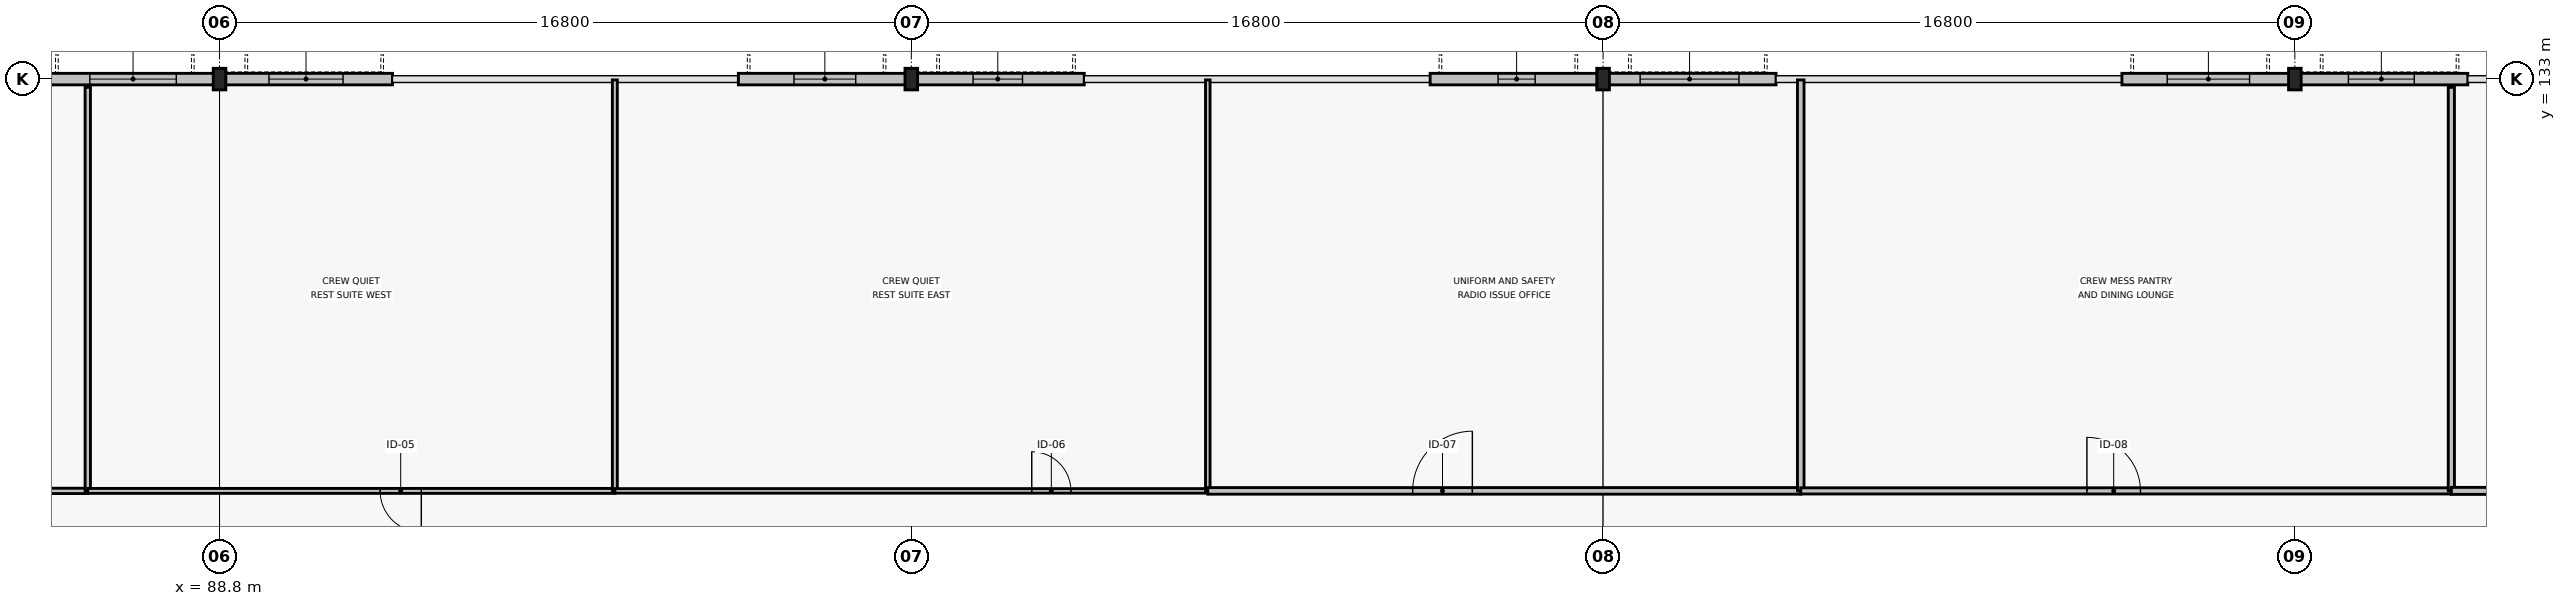
"""IFC4 building model, lengths in metres.
Left out: names, types, materials, properties, quantities, classifications, styles, units other than length and angle.
Written with IfcOpenShell. Run it as: python <this file> out.ifc"""

import sys

from ifc_helpers import new_model, si_unit, direction, frame, frame_2d, origin, origin_2d, place, context, subcontext, project, spatial, rectangle, i_section, extrude, element, fill, save


model = new_model("IFC4")
c1 = context("Model", 3, precision=1e-05, world=origin(), true_north=direction((0.0, 1.0)))
c2 = subcontext(c1, "Body", "Model", "MODEL_VIEW")
j1 = project(units=[si_unit("LENGTHUNIT", "METRE"), si_unit("PLANEANGLEUNIT", "RADIAN")], contexts=[c1])
p1 = place(None, origin())
s1 = spatial("IfcSite", under=j1, at=p1, CompositionType="ELEMENT")
p2 = place(p1, origin())
s2 = spatial("IfcBuilding", under=s1, at=p2, CompositionType="ELEMENT")
p3 = place(p2, frame((0.0, 0.0, 5.4)))
s3 = spatial("IfcBuildingStorey", under=s2, at=p3, CompositionType="ELEMENT", Elevation=5.4)
for number, where, z_axis, x_axis in (
    (1, (88.8, 133.0, 0.0), (0.0, 0.0, 1.0), (1.0, 0.0, 0.0)),
    (2, (105.6, 133.0, 0.0), (0.0, 0.0, 1.0), (1.0, 0.0, 0.0)),
    (3, (122.4, 133.0, 0.0), (0.0, 0.0, 1.0), (1.0, 0.0, 0.0)),
    (4, (139.2, 133.0, 0.0), (0.0, 0.0, 1.0), (1.0, 0.0, 0.0)),
):
    element("IfcColumn", number, at=place(p3, frame(where, z_axis=z_axis, x_axis=x_axis)), inside=s3, PredefinedType="COLUMN", context=c2, shape_type="SweptSolid", body=[
        extrude(i_section(OverallWidth=0.306, OverallDepth=0.524, WebThickness=0.021, FlangeThickness=0.04, FilletRadius=0.027, at=origin_2d()), origin(), (0.0, 0.0, 1.0), 5.4),
    ])
p4 = place(p3, frame((84.6, 133.0, 0.0), z_axis=(0.0, 0.0, 1.0), x_axis=(1.0, 0.0, 0.0)))
e5 = element("IfcWall", 5, at=p4, inside=s3, PredefinedType="STANDARD", context=c2, shape_type="SweptSolid", body=[
    extrude(rectangle(XDim=4.2, YDim=0.28, at=frame_2d((2.1, 0.0))), origin(), (0.0, 0.0, 1.0), 4.765),
])
p5 = place(p4, frame((1.05, 0.0, 0.8)))
e6 = element("IfcOpeningElement", 6, at=p5, cuts=e5, PredefinedType="OPENING", context=c2, shape_type="SweptSolid", body=[
    extrude(rectangle(XDim=2.1, YDim=1.75, at=frame_2d((1.05, 0.875))), frame((0.0, 0.15, 0.0), z_axis=(0.0, -1.0, 0.0), x_axis=(1.0, 0.0, 0.0)), (0.0, 0.0, 1.0), 0.3),
])
p6 = place(p3, frame((88.8, 133.0, 0.0), z_axis=(0.0, 0.0, 1.0), x_axis=(1.0, 0.0, 0.0)))
e7 = element("IfcWall", 7, at=p6, inside=s3, PredefinedType="STANDARD", context=c2, shape_type="SweptSolid", body=[
    extrude(rectangle(XDim=4.2, YDim=0.28, at=frame_2d((2.1, 0.0))), origin(), (0.0, 0.0, 1.0), 4.765),
])
p7 = place(p6, frame((1.2, 0.0, 0.8)))
e8 = element("IfcOpeningElement", 8, at=p7, cuts=e7, PredefinedType="OPENING", context=c2, shape_type="SweptSolid", body=[
    extrude(rectangle(XDim=1.8, YDim=1.75, at=frame_2d((0.9, 0.875))), frame((0.0, 0.15, 0.0), z_axis=(0.0, -1.0, 0.0), x_axis=(1.0, 0.0, 0.0)), (0.0, 0.0, 1.0), 0.3),
])
p8 = place(p3, frame((101.4, 133.0, 0.0), z_axis=(0.0, 0.0, 1.0), x_axis=(1.0, 0.0, 0.0)))
e9 = element("IfcWall", 9, at=p8, inside=s3, PredefinedType="STANDARD", context=c2, shape_type="SweptSolid", body=[
    extrude(rectangle(XDim=4.2, YDim=0.28, at=frame_2d((2.1, 0.0))), origin(), (0.0, 0.0, 1.0), 4.765),
])
p9 = place(p8, frame((1.35, 0.0, 0.8)))
e10 = element("IfcOpeningElement", 10, at=p9, cuts=e9, PredefinedType="OPENING", context=c2, shape_type="SweptSolid", body=[
    extrude(rectangle(XDim=1.5, YDim=1.75, at=frame_2d((0.75, 0.875))), frame((0.0, 0.15, 0.0), z_axis=(0.0, -1.0, 0.0), x_axis=(1.0, 0.0, 0.0)), (0.0, 0.0, 1.0), 0.3),
])
p10 = place(p3, frame((105.6, 133.0, 0.0), z_axis=(0.0, 0.0, 1.0), x_axis=(1.0, 0.0, 0.0)))
e11 = element("IfcWall", 11, at=p10, inside=s3, PredefinedType="STANDARD", context=c2, shape_type="SweptSolid", body=[
    extrude(rectangle(XDim=4.2, YDim=0.28, at=frame_2d((2.1, 0.0))), origin(), (0.0, 0.0, 1.0), 4.765),
])
p11 = place(p10, frame((1.5, 0.0, 0.8)))
e12 = element("IfcOpeningElement", 12, at=p11, cuts=e11, PredefinedType="OPENING", context=c2, shape_type="SweptSolid", body=[
    extrude(rectangle(XDim=1.2, YDim=1.75, at=frame_2d((0.6, 0.875))), frame((0.0, 0.15, 0.0), z_axis=(0.0, -1.0, 0.0), x_axis=(1.0, 0.0, 0.0)), (0.0, 0.0, 1.0), 0.3),
])
p12 = place(p3, frame((118.2, 133.0, 0.0), z_axis=(0.0, 0.0, 1.0), x_axis=(1.0, 0.0, 0.0)))
e13 = element("IfcWall", 13, at=p12, inside=s3, PredefinedType="STANDARD", context=c2, shape_type="SweptSolid", body=[
    extrude(rectangle(XDim=4.2, YDim=0.28, at=frame_2d((2.1, 0.0))), origin(), (0.0, 0.0, 1.0), 4.765),
])
p13 = place(p12, frame((1.65, 0.0, 0.8)))
e14 = element("IfcOpeningElement", 14, at=p13, cuts=e13, PredefinedType="OPENING", context=c2, shape_type="SweptSolid", body=[
    extrude(rectangle(XDim=0.9, YDim=1.75, at=frame_2d((0.45, 0.875))), frame((0.0, 0.15, 0.0), z_axis=(0.0, -1.0, 0.0), x_axis=(1.0, 0.0, 0.0)), (0.0, 0.0, 1.0), 0.3),
])
p14 = place(p3, frame((122.4, 133.0, 0.0), z_axis=(0.0, 0.0, 1.0), x_axis=(1.0, 0.0, 0.0)))
e15 = element("IfcWall", 15, at=p14, inside=s3, PredefinedType="STANDARD", context=c2, shape_type="SweptSolid", body=[
    extrude(rectangle(XDim=4.2, YDim=0.28, at=frame_2d((2.1, 0.0))), origin(), (0.0, 0.0, 1.0), 4.765),
])
p15 = place(p14, frame((0.9, 0.0, 0.8)))
e16 = element("IfcOpeningElement", 16, at=p15, cuts=e15, PredefinedType="OPENING", context=c2, shape_type="SweptSolid", body=[
    extrude(rectangle(XDim=2.4, YDim=1.5, at=frame_2d((1.2, 0.75))), frame((0.0, 0.15, 0.0), z_axis=(0.0, -1.0, 0.0), x_axis=(1.0, 0.0, 0.0)), (0.0, 0.0, 1.0), 0.3),
])
p16 = place(p3, frame((135.0, 133.0, 0.0), z_axis=(0.0, 0.0, 1.0), x_axis=(1.0, 0.0, 0.0)))
e17 = element("IfcWall", 17, at=p16, inside=s3, PredefinedType="STANDARD", context=c2, shape_type="SweptSolid", body=[
    extrude(rectangle(XDim=4.2, YDim=0.28, at=frame_2d((2.1, 0.0))), origin(), (0.0, 0.0, 1.0), 4.765),
])
p17 = place(p16, frame((1.1, 0.0, 0.8)))
e18 = element("IfcOpeningElement", 18, at=p17, cuts=e17, PredefinedType="OPENING", context=c2, shape_type="SweptSolid", body=[
    extrude(rectangle(XDim=2.0, YDim=1.5, at=frame_2d((1.0, 0.75))), frame((0.0, 0.15, 0.0), z_axis=(0.0, -1.0, 0.0), x_axis=(1.0, 0.0, 0.0)), (0.0, 0.0, 1.0), 0.3),
])
p18 = place(p3, frame((139.2, 133.0, 0.0), z_axis=(0.0, 0.0, 1.0), x_axis=(1.0, 0.0, 0.0)))
e19 = element("IfcWall", 19, at=p18, inside=s3, PredefinedType="STANDARD", context=c2, shape_type="SweptSolid", body=[
    extrude(rectangle(XDim=4.2, YDim=0.28, at=frame_2d((2.1, 0.0))), origin(), (0.0, 0.0, 1.0), 4.765),
])
p19 = place(p18, frame((1.3, 0.0, 0.8)))
e20 = element("IfcOpeningElement", 20, at=p19, cuts=e19, PredefinedType="OPENING", context=c2, shape_type="SweptSolid", body=[
    extrude(rectangle(XDim=1.6, YDim=1.5, at=frame_2d((0.8, 0.75))), frame((0.0, 0.15, 0.0), z_axis=(0.0, -1.0, 0.0), x_axis=(1.0, 0.0, 0.0)), (0.0, 0.0, 1.0), 0.3),
])
p20 = place(p3, frame((69.6, 123.0, 0.0), z_axis=(0.0, 0.0, 1.0), x_axis=(1.0, 0.0, 0.0)))
e21 = element("IfcWall", 21, at=p20, inside=s3, PredefinedType="PARTITIONING", context=c2, shape_type="SweptSolid", body=[
    extrude(rectangle(XDim=16.0, YDim=0.13, at=frame_2d((8.0, 0.0))), origin(), (0.0, 0.0, 1.0), 5.16),
])
p21 = place(p20, frame((8.55, 0.0, 0.0), z_axis=(0.0, 0.0, 1.0), x_axis=(-1.0, 0.0, 0.0)))
e22 = element("IfcOpeningElement", 22, at=p21, cuts=e21, PredefinedType="OPENING", context=c2, shape_type="SweptSolid", body=[
    extrude(rectangle(XDim=1.1, YDim=2.15, at=frame_2d((0.55, 1.075))), frame((0.0, 0.075, 0.0), z_axis=(0.0, -1.0, 0.0), x_axis=(1.0, 0.0, 0.0)), (0.0, 0.0, 1.0), 0.15),
])
p22 = place(p3, frame((85.6, 123.0, 0.0), z_axis=(0.0, 0.0, 1.0), x_axis=(0.0, 1.0, 0.0)))
e23 = element("IfcWall", 23, at=p22, inside=s3, PredefinedType="PARTITIONING", context=c2, shape_type="SweptSolid", body=[
    extrude(rectangle(XDim=9.8, YDim=0.13, at=frame_2d((4.9, 0.0))), origin(), (0.0, 0.0, 1.0), 5.16),
])
p23 = place(p3, frame((85.6, 123.0, 0.0), z_axis=(0.0, 0.0, 1.0), x_axis=(1.0, 0.0, 0.0)))
e24 = element("IfcWall", 24, at=p23, inside=s3, PredefinedType="PARTITIONING", context=c2, shape_type="SweptSolid", body=[
    extrude(rectangle(XDim=12.8, YDim=0.12, at=frame_2d((6.4, 0.0))), origin(), (0.0, 0.0, 1.0), 5.16),
])
p24 = place(p23, frame((7.1, 0.0, 0.0)))
e25 = element("IfcOpeningElement", 25, at=p24, cuts=e24, PredefinedType="OPENING", context=c2, shape_type="SweptSolid", body=[
    extrude(rectangle(XDim=1.0, YDim=2.15, at=frame_2d((0.5, 1.075))), frame((0.0, 0.07, 0.0), z_axis=(0.0, -1.0, 0.0), x_axis=(1.0, 0.0, 0.0)), (0.0, 0.0, 1.0), 0.14),
])
p25 = place(p3, frame((98.4, 123.0, 0.0), z_axis=(0.0, 0.0, 1.0), x_axis=(0.0, 1.0, 0.0)))
e26 = element("IfcWall", 26, at=p25, inside=s3, PredefinedType="PARTITIONING", context=c2, shape_type="SweptSolid", body=[
    extrude(rectangle(XDim=9.98, YDim=0.12, at=frame_2d((4.99, 0.0))), origin(), (0.0, 0.0, 1.0), 5.16),
])
p26 = place(p3, frame((98.4, 123.0, 0.0), z_axis=(0.0, 0.0, 1.0), x_axis=(1.0, 0.0, 0.0)))
e27 = element("IfcWall", 27, at=p26, inside=s3, PredefinedType="MOVABLE", context=c2, shape_type="SweptSolid", body=[
    extrude(rectangle(XDim=14.4, YDim=0.11, at=frame_2d((7.2, 0.0))), origin(), (0.0, 0.0, 1.0), 5.16),
])
p27 = place(p26, frame((10.125, 0.0, 0.0)))
e28 = element("IfcOpeningElement", 28, at=p27, cuts=e27, PredefinedType="OPENING", context=c2, shape_type="SweptSolid", body=[
    extrude(rectangle(XDim=0.95, YDim=2.15, at=frame_2d((0.475, 1.075))), frame((0.0, 0.065, 0.0), z_axis=(0.0, -1.0, 0.0), x_axis=(1.0, 0.0, 0.0)), (0.0, 0.0, 1.0), 0.13),
])
p28 = place(p3, frame((112.8, 123.0, 0.0), z_axis=(0.0, 0.0, 1.0), x_axis=(0.0, 1.0, 0.0)))
e29 = element("IfcWall", 29, at=p28, inside=s3, PredefinedType="MOVABLE", context=c2, shape_type="SweptSolid", body=[
    extrude(rectangle(XDim=9.98, YDim=0.11, at=frame_2d((4.99, 0.0))), origin(), (0.0, 0.0, 1.0), 5.16),
])
p29 = place(p3, frame((112.8, 123.0, 0.0), z_axis=(0.0, 0.0, 1.0), x_axis=(1.0, 0.0, 0.0)))
e30 = element("IfcWall", 30, at=p29, inside=s3, PredefinedType="PARTITIONING", context=c2, shape_type="SweptSolid", body=[
    extrude(rectangle(XDim=14.4, YDim=0.16, at=frame_2d((7.2, 0.0))), origin(), (0.0, 0.0, 1.0), 5.16),
])
p30 = place(p29, frame((6.425, 0.0, 0.0), z_axis=(0.0, 0.0, 1.0), x_axis=(-1.0, 0.0, 0.0)))
e31 = element("IfcOpeningElement", 31, at=p30, cuts=e30, PredefinedType="OPENING", context=c2, shape_type="SweptSolid", body=[
    extrude(rectangle(XDim=1.45, YDim=2.25, at=frame_2d((0.725, 1.125))), frame((0.0, 0.09, 0.0), z_axis=(0.0, -1.0, 0.0), x_axis=(1.0, 0.0, 0.0)), (0.0, 0.0, 1.0), 0.18),
])
p31 = place(p3, frame((127.2, 123.0, 0.0), z_axis=(0.0, 0.0, 1.0), x_axis=(0.0, 1.0, 0.0)))
e32 = element("IfcWall", 32, at=p31, inside=s3, PredefinedType="PARTITIONING", context=c2, shape_type="SweptSolid", body=[
    extrude(rectangle(XDim=9.98, YDim=0.16, at=frame_2d((4.99, 0.0))), origin(), (0.0, 0.0, 1.0), 5.16),
])
p32 = place(p3, frame((127.2, 123.0, 0.0), z_axis=(0.0, 0.0, 1.0), x_axis=(1.0, 0.0, 0.0)))
e33 = element("IfcWall", 33, at=p32, inside=s3, PredefinedType="PARTITIONING", context=c2, shape_type="SweptSolid", body=[
    extrude(rectangle(XDim=15.8, YDim=0.15, at=frame_2d((7.9, 0.0))), origin(), (0.0, 0.0, 1.0), 5.16),
])
p33 = place(p32, frame((6.95, 0.0, 0.0)))
e34 = element("IfcOpeningElement", 34, at=p33, cuts=e33, PredefinedType="OPENING", context=c2, shape_type="SweptSolid", body=[
    extrude(rectangle(XDim=1.3, YDim=2.15, at=frame_2d((0.65, 1.075))), frame((0.0, 0.085, 0.0), z_axis=(0.0, -1.0, 0.0), x_axis=(1.0, 0.0, 0.0)), (0.0, 0.0, 1.0), 0.17),
])
p34 = place(p3, frame((143.0, 123.0, 0.0), z_axis=(0.0, 0.0, 1.0), x_axis=(0.0, 1.0, 0.0)))
e35 = element("IfcWall", 35, at=p34, inside=s3, PredefinedType="PARTITIONING", context=c2, shape_type="SweptSolid", body=[
    extrude(rectangle(XDim=9.8, YDim=0.15, at=frame_2d((4.9, 0.0))), origin(), (0.0, 0.0, 1.0), 5.16),
])
p35 = place(p3, frame((143.0, 123.0, 0.0), z_axis=(0.0, 0.0, 1.0), x_axis=(1.0, 0.0, 0.0)))
e36 = element("IfcWall", 36, at=p35, inside=s3, PredefinedType="PLUMBINGWALL", context=c2, shape_type="SweptSolid", body=[
    extrude(rectangle(XDim=7.0, YDim=0.17, at=frame_2d((3.5, 0.0))), origin(), (0.0, 0.0, 1.0), 5.16),
])
p36 = place(p35, frame((3.025, 0.0, 0.0)))
e37 = element("IfcOpeningElement", 37, at=p36, cuts=e36, PredefinedType="OPENING", context=c2, shape_type="SweptSolid", body=[
    extrude(rectangle(XDim=0.95, YDim=2.15, at=frame_2d((0.475, 1.075))), frame((0.0, 0.095, 0.0), z_axis=(0.0, -1.0, 0.0), x_axis=(1.0, 0.0, 0.0)), (0.0, 0.0, 1.0), 0.19),
])
p37 = place(p5, origin())
e38 = element("IfcWindow", 38, at=p37, inside=s3, PartitioningType="SINGLE_PANEL", PredefinedType="WINDOW", context=c2, shape_type="SweptSolid", body=[
    extrude(rectangle(XDim=2.1, YDim=1.75, at=frame_2d((1.05, 0.875))), frame((0.0, 0.03, 0.0), z_axis=(0.0, -1.0, 0.0), x_axis=(1.0, 0.0, 0.0)), (0.0, 0.0, 1.0), 0.06),
])
fill(e6, e38)
p38 = place(p7, origin())
e39 = element("IfcWindow", 39, at=p38, inside=s3, PartitioningType="SINGLE_PANEL", PredefinedType="WINDOW", context=c2, shape_type="SweptSolid", body=[
    extrude(rectangle(XDim=1.8, YDim=1.75, at=frame_2d((0.9, 0.875))), frame((0.0, 0.03, 0.0), z_axis=(0.0, -1.0, 0.0), x_axis=(1.0, 0.0, 0.0)), (0.0, 0.0, 1.0), 0.06),
])
fill(e8, e39)
p39 = place(p9, origin())
e40 = element("IfcWindow", 40, at=p39, inside=s3, PartitioningType="SINGLE_PANEL", PredefinedType="WINDOW", context=c2, shape_type="SweptSolid", body=[
    extrude(rectangle(XDim=1.5, YDim=1.75, at=frame_2d((0.75, 0.875))), frame((0.0, 0.03, 0.0), z_axis=(0.0, -1.0, 0.0), x_axis=(1.0, 0.0, 0.0)), (0.0, 0.0, 1.0), 0.06),
])
fill(e10, e40)
p40 = place(p11, origin())
e41 = element("IfcWindow", 41, at=p40, inside=s3, PartitioningType="SINGLE_PANEL", PredefinedType="WINDOW", context=c2, shape_type="SweptSolid", body=[
    extrude(rectangle(XDim=1.2, YDim=1.75, at=frame_2d((0.6, 0.875))), frame((0.0, 0.03, 0.0), z_axis=(0.0, -1.0, 0.0), x_axis=(1.0, 0.0, 0.0)), (0.0, 0.0, 1.0), 0.06),
])
fill(e12, e41)
p41 = place(p13, origin())
e42 = element("IfcWindow", 42, at=p41, inside=s3, PartitioningType="SINGLE_PANEL", PredefinedType="WINDOW", context=c2, shape_type="SweptSolid", body=[
    extrude(rectangle(XDim=0.9, YDim=1.75, at=frame_2d((0.45, 0.875))), frame((0.0, 0.03, 0.0), z_axis=(0.0, -1.0, 0.0), x_axis=(1.0, 0.0, 0.0)), (0.0, 0.0, 1.0), 0.06),
])
fill(e14, e42)
p42 = place(p15, origin())
e43 = element("IfcWindow", 43, at=p42, inside=s3, PartitioningType="SINGLE_PANEL", PredefinedType="WINDOW", context=c2, shape_type="SweptSolid", body=[
    extrude(rectangle(XDim=2.4, YDim=1.5, at=frame_2d((1.2, 0.75))), frame((0.0, 0.03, 0.0), z_axis=(0.0, -1.0, 0.0), x_axis=(1.0, 0.0, 0.0)), (0.0, 0.0, 1.0), 0.06),
])
fill(e16, e43)
p43 = place(p17, origin())
e44 = element("IfcWindow", 44, at=p43, inside=s3, PartitioningType="SINGLE_PANEL", PredefinedType="WINDOW", context=c2, shape_type="SweptSolid", body=[
    extrude(rectangle(XDim=2.0, YDim=1.5, at=frame_2d((1.0, 0.75))), frame((0.0, 0.03, 0.0), z_axis=(0.0, -1.0, 0.0), x_axis=(1.0, 0.0, 0.0)), (0.0, 0.0, 1.0), 0.06),
])
fill(e18, e44)
p44 = place(p19, origin())
e45 = element("IfcWindow", 45, at=p44, inside=s3, PartitioningType="SINGLE_PANEL", PredefinedType="WINDOW", context=c2, shape_type="SweptSolid", body=[
    extrude(rectangle(XDim=1.6, YDim=1.5, at=frame_2d((0.8, 0.75))), frame((0.0, 0.03, 0.0), z_axis=(0.0, -1.0, 0.0), x_axis=(1.0, 0.0, 0.0)), (0.0, 0.0, 1.0), 0.06),
])
fill(e20, e45)
p45 = place(p24, origin())
e46 = element("IfcDoor", 46, at=p45, inside=s3, OperationType="SINGLE_SWING_RIGHT", PredefinedType="DOOR", context=c2, shape_type="SweptSolid", body=[
    extrude(rectangle(XDim=1.0, YDim=2.15, at=frame_2d((0.5, 1.075))), frame((0.0, 0.025, 0.0), z_axis=(0.0, -1.0, 0.0), x_axis=(1.0, 0.0, 0.0)), (0.0, 0.0, 1.0), 0.05),
])
fill(e25, e46)
p46 = place(p27, origin())
e47 = element("IfcDoor", 47, at=p46, inside=s3, OperationType="SINGLE_SWING_LEFT", PredefinedType="DOOR", context=c2, shape_type="SweptSolid", body=[
    extrude(rectangle(XDim=0.95, YDim=2.15, at=frame_2d((0.475, 1.075))), frame((0.0, 0.025, 0.0), z_axis=(0.0, -1.0, 0.0), x_axis=(1.0, 0.0, 0.0)), (0.0, 0.0, 1.0), 0.05),
])
fill(e28, e47)
p47 = place(p30, origin())
e48 = element("IfcDoor", 48, at=p47, inside=s3, OperationType="SINGLE_SWING_RIGHT", PredefinedType="DOOR", context=c2, shape_type="SweptSolid", body=[
    extrude(rectangle(XDim=1.45, YDim=2.25, at=frame_2d((0.725, 1.125))), frame((0.0, 0.025, 0.0), z_axis=(0.0, -1.0, 0.0), x_axis=(1.0, 0.0, 0.0)), (0.0, 0.0, 1.0), 0.05),
])
fill(e31, e48)
p48 = place(p33, origin())
e49 = element("IfcDoor", 49, at=p48, inside=s3, OperationType="SINGLE_SWING_LEFT", PredefinedType="DOOR", context=c2, shape_type="SweptSolid", body=[
    extrude(rectangle(XDim=1.3, YDim=2.15, at=frame_2d((0.65, 1.075))), frame((0.0, 0.025, 0.0), z_axis=(0.0, -1.0, 0.0), x_axis=(1.0, 0.0, 0.0)), (0.0, 0.0, 1.0), 0.05),
])
fill(e34, e49)
save(model, sys.argv[1])
